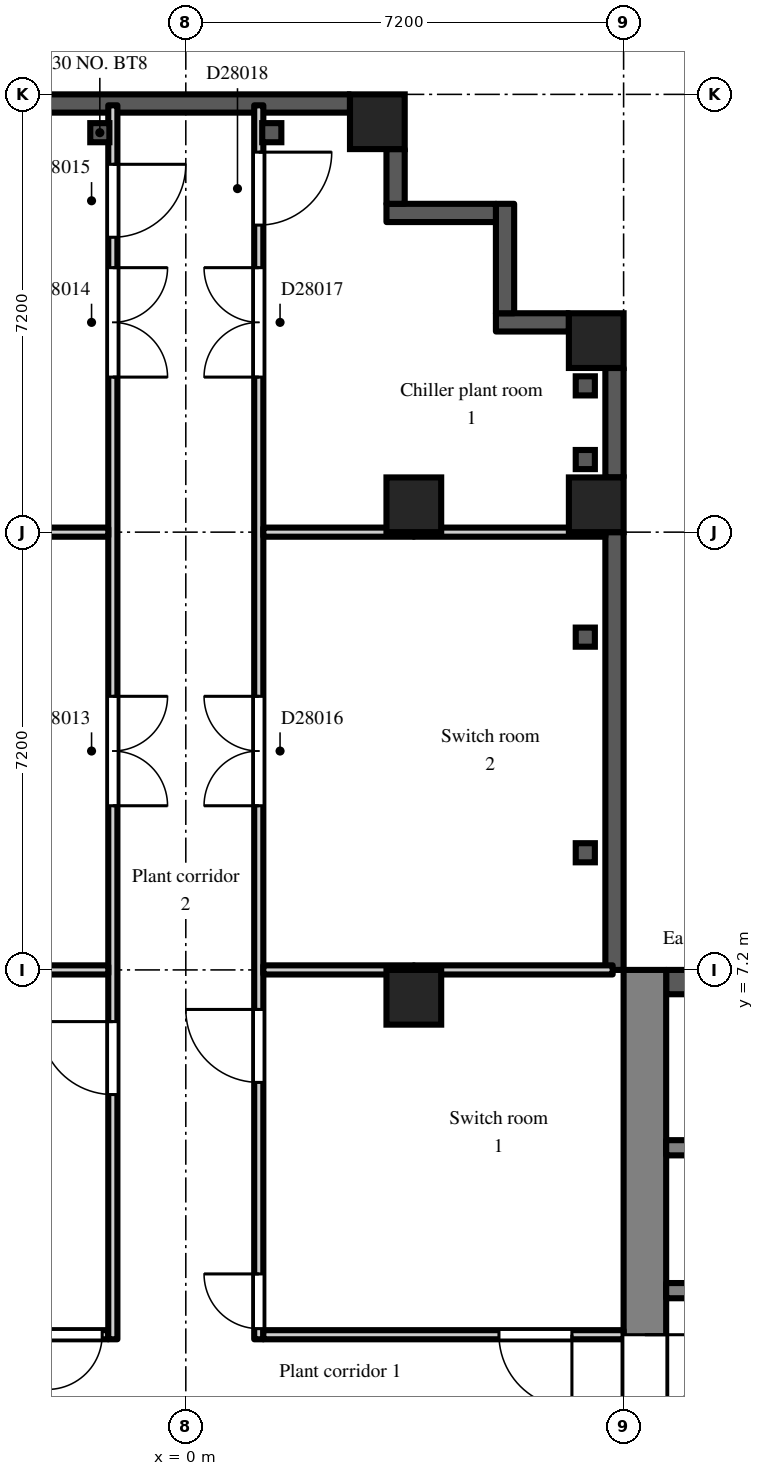
"""IFC4 building model, lengths in metres.
Left out: names, types, materials, properties, quantities, classifications, styles, units other than length and angle.
Written with IfcOpenShell. Run it as: python <this file> out.ifc"""

import sys

from ifc_helpers import new_model, si_unit, direction, frame, frame_2d, origin, origin_2d, place, context, subcontext, project, spatial, rectangle, extrude, element, fill, save


model = new_model("IFC4")
c1 = context("Model", 3, precision=1e-05, world=origin(), true_north=direction((0.0, 1.0)))
c2 = subcontext(c1, "Body", "Model", "MODEL_VIEW")
j1 = project(units=[si_unit("LENGTHUNIT", "METRE"), si_unit("PLANEANGLEUNIT", "RADIAN")], contexts=[c1])
p1 = place(None, origin())
s1 = spatial("IfcSite", under=j1, at=p1, CompositionType="ELEMENT")
p2 = place(p1, origin())
s2 = spatial("IfcBuilding", under=s1, at=p2, CompositionType="ELEMENT")
p3 = place(p2, frame((0.0, 0.0, 194.7)))
s3 = spatial("IfcBuildingStorey", under=s2, at=p3, CompositionType="ELEMENT", Elevation=194.7)
for number, where, z_axis, x_axis in (
    (1, (3.15, 21.15, 0.0), (0.0, 0.0, 1.0), (1.0, 0.0, 0.0)),
    (2, (3.75, 6.75, 0.0), (0.0, 0.0, 1.0), (1.0, 0.0, 0.0)),
    (3, (3.75, 14.85, 0.0), (0.0, 0.0, 1.0), (1.0, 0.0, 0.0)),
    (4, (6.75, 14.85, 0.0), (0.0, 0.0, 1.0), (1.0, 0.0, 0.0)),
    (5, (6.75, 17.55, 0.0), (0.0, 0.0, 1.0), (1.0, 0.0, 0.0)),
):
    element("IfcColumn", number, at=place(p3, frame(where, z_axis=z_axis, x_axis=x_axis)), inside=s3, PredefinedType="COLUMN", context=c2, shape_type="SweptSolid", body=[
        extrude(rectangle(XDim=0.9, YDim=0.9, at=origin_2d()), origin(), (0.0, 0.0, 1.0), 4.2),
    ])
p4 = place(p3, frame((7.05, 7.2, 0.0), z_axis=(0.0, 0.0, 1.0), x_axis=(0.0, 1.0, 0.0)))
e6 = element("IfcWall", 6, at=p4, inside=s3, PredefinedType="SOLIDWALL", context=c2, shape_type="SweptSolid", body=[
    extrude(rectangle(XDim=7.2, YDim=0.3, at=frame_2d((3.6, 0.0))), origin(), (0.0, 0.0, 1.0), 3.8),
])
p5 = place(p3, frame((7.05, 15.3, 0.0), z_axis=(0.0, 0.0, 1.0), x_axis=(0.0, 1.0, 0.0)))
e7 = element("IfcWall", 7, at=p5, inside=s3, PredefinedType="SOLIDWALL", context=c2, shape_type="SweptSolid", body=[
    extrude(rectangle(XDim=1.8, YDim=0.3, at=frame_2d((0.9, 0.0))), origin(), (0.0, 0.0, 1.0), 3.5),
])
p6 = place(p3, frame((6.3, 17.85, 0.0), z_axis=(0.0, 0.0, 1.0), x_axis=(-1.0, 0.0, 0.0)))
e8 = element("IfcWall", 8, at=p6, inside=s3, PredefinedType="SOLIDWALL", context=c2, shape_type="SweptSolid", body=[
    extrude(rectangle(XDim=1.2, YDim=0.3, at=frame_2d((0.6, 0.0))), origin(), (0.0, 0.0, 1.0), 3.8),
])
for number, where, z_axis, x_axis in (
    (9, (5.25, 18.0, 0.0), (0.0, 0.0, 1.0), (0.0, 1.0, 0.0)),
    (10, (5.1, 19.65, 0.0), (0.0, 0.0, 1.0), (-1.0, 0.0, 0.0)),
):
    element("IfcWall", number, at=place(p3, frame(where, z_axis=z_axis, x_axis=x_axis)), inside=s3, PredefinedType="SOLIDWALL", context=c2, shape_type="SweptSolid", body=[
        extrude(rectangle(XDim=1.8, YDim=0.3, at=frame_2d((0.9, 0.0))), origin(), (0.0, 0.0, 1.0), 3.8),
    ])
p7 = place(p3, frame((3.45, 19.8, 0.0), z_axis=(0.0, 0.0, 1.0), x_axis=(0.0, 1.0, 0.0)))
e11 = element("IfcWall", 11, at=p7, inside=s3, PredefinedType="SOLIDWALL", context=c2, shape_type="SweptSolid", body=[
    extrude(rectangle(XDim=0.9, YDim=0.3, at=frame_2d((0.45, 0.0))), origin(), (0.0, 0.0, 1.0), 3.8),
])
p8 = place(p3, frame((2.7, 21.45, 0.0), z_axis=(0.0, 0.0, 1.0), x_axis=(-1.0, 0.0, 0.0)))
e12 = element("IfcWall", 12, at=p8, inside=s3, PredefinedType="SOLIDWALL", context=c2, shape_type="SweptSolid", body=[
    extrude(rectangle(XDim=5.4, YDim=0.3, at=frame_2d((2.7, 0.0))), origin(), (0.0, 0.0, 1.0), 3.5),
])
p9 = place(p3, frame((7.55, -7.2, 0.0), z_axis=(0.0, 0.0, 1.0), x_axis=(0.0, 1.0, 0.0)))
e13 = element("IfcWall", 13, at=p9, inside=s3, PredefinedType="SHEAR", context=c2, shape_type="SweptSolid", body=[
    extrude(rectangle(XDim=14.4, YDim=0.7, at=frame_2d((7.2, 0.0))), origin(), (0.0, 0.0, 1.0), 3.8),
])
p10 = place(p9, frame((6.0, 0.0, 0.0)))
e14 = element("IfcOpeningElement", 14, at=p10, cuts=e13, PredefinedType="OPENING", context=c2, shape_type="SweptSolid", body=[
    extrude(rectangle(XDim=2.4, YDim=2.2, at=frame_2d((1.2, 1.1))), frame((0.0, 0.36, 0.0), z_axis=(0.0, -1.0, 0.0), x_axis=(1.0, 0.0, 0.0)), (0.0, 0.0, 1.0), 0.72),
])
p11 = place(p3, frame((7.9, 7.0, 0.0), z_axis=(0.0, 0.0, 1.0), x_axis=(1.0, 0.0, 0.0)))
e15 = element("IfcWall", 15, at=p11, inside=s3, PredefinedType="SHEAR", context=c2, shape_type="SweptSolid", body=[
    extrude(rectangle(XDim=12.95, YDim=0.4, at=frame_2d((6.475, 0.0))), origin(), (0.0, 0.0, 1.0), 3.8),
])
p12 = place(p3, frame((7.9, 1.925, 0.0), z_axis=(0.0, 0.0, 1.0), x_axis=(1.0, 0.0, 0.0)))
e16 = element("IfcWall", 16, at=p12, inside=s3, PredefinedType="SHEAR", context=c2, shape_type="SweptSolid", body=[
    extrude(rectangle(XDim=12.95, YDim=0.25, at=frame_2d((6.475, 0.0))), origin(), (0.0, 0.0, 1.0), 3.8),
])
p13 = place(p12, frame((4.825, 0.0, 0.0)))
e17 = element("IfcOpeningElement", 17, at=p13, cuts=e16, PredefinedType="OPENING", context=c2, shape_type="SweptSolid", body=[
    extrude(rectangle(XDim=1.1, YDim=2.1, at=frame_2d((0.55, 1.05))), frame((0.0, 0.135, 0.0), z_axis=(0.0, -1.0, 0.0), x_axis=(1.0, 0.0, 0.0)), (0.0, 0.0, 1.0), 0.27),
])
p14 = place(p12, frame((7.025, 0.0, 0.0)))
e18 = element("IfcOpeningElement", 18, at=p14, cuts=e16, PredefinedType="OPENING", context=c2, shape_type="SweptSolid", body=[
    extrude(rectangle(XDim=1.1, YDim=2.1, at=frame_2d((0.55, 1.05))), frame((0.0, 0.135, 0.0), z_axis=(0.0, -1.0, 0.0), x_axis=(1.0, 0.0, 0.0)), (0.0, 0.0, 1.0), 0.27),
])
p15 = place(p12, frame((9.225, 0.0, 0.0)))
e19 = element("IfcOpeningElement", 19, at=p15, cuts=e16, PredefinedType="OPENING", context=c2, shape_type="SweptSolid", body=[
    extrude(rectangle(XDim=1.1, YDim=2.1, at=frame_2d((0.55, 1.05))), frame((0.0, 0.135, 0.0), z_axis=(0.0, -1.0, 0.0), x_axis=(1.0, 0.0, 0.0)), (0.0, 0.0, 1.0), 0.27),
])
p16 = place(p12, frame((0.525, 0.0, 0.0)))
e20 = element("IfcOpeningElement", 20, at=p16, cuts=e16, PredefinedType="OPENING", context=c2, shape_type="SweptSolid", body=[
    extrude(rectangle(XDim=0.9, YDim=2.1, at=frame_2d((0.45, 1.05))), frame((0.0, 0.135, 0.0), z_axis=(0.0, -1.0, 0.0), x_axis=(1.0, 0.0, 0.0)), (0.0, 0.0, 1.0), 0.27),
])
p17 = place(p12, frame((2.625, 0.0, 0.0)))
e21 = element("IfcOpeningElement", 21, at=p17, cuts=e16, PredefinedType="OPENING", context=c2, shape_type="SweptSolid", body=[
    extrude(rectangle(XDim=1.1, YDim=2.1, at=frame_2d((0.55, 1.05))), frame((0.0, 0.135, 0.0), z_axis=(0.0, -1.0, 0.0), x_axis=(1.0, 0.0, 0.0)), (0.0, 0.0, 1.0), 0.27),
])
p18 = place(p12, frame((11.525, 0.0, 0.0)))
e22 = element("IfcOpeningElement", 22, at=p18, cuts=e16, PredefinedType="OPENING", context=c2, shape_type="SweptSolid", body=[
    extrude(rectangle(XDim=0.9, YDim=2.1, at=frame_2d((0.45, 1.05))), frame((0.0, 0.135, 0.0), z_axis=(0.0, -1.0, 0.0), x_axis=(1.0, 0.0, 0.0)), (0.0, 0.0, 1.0), 0.27),
])
p19 = place(p3, frame((7.9, 4.275, 0.0), z_axis=(0.0, 0.0, 1.0), x_axis=(1.0, 0.0, 0.0)))
e23 = element("IfcWall", 23, at=p19, inside=s3, PredefinedType="SHEAR", context=c2, shape_type="SweptSolid", body=[
    extrude(rectangle(XDim=1.95, YDim=0.25, at=frame_2d((0.975, 0.0))), origin(), (0.0, 0.0, 1.0), 3.8),
])
p20 = place(p3, frame((-7.2, 1.2, 0.0), z_axis=(0.0, 0.0, 1.0), x_axis=(1.0, 0.0, 0.0)))
e24 = element("IfcWall", 24, at=p20, inside=s3, PredefinedType="PARTITIONING", context=c2, shape_type="SweptSolid", body=[
    extrude(rectangle(XDim=5.925, YDim=0.15, at=frame_2d((2.962, 0.0))), origin(), (0.0, 0.0, 1.0), 3.8),
])
p21 = place(p20, frame((0.65, 0.0, 0.0)))
e25 = element("IfcOpeningElement", 25, at=p21, cuts=e24, PredefinedType="OPENING", context=c2, shape_type="SweptSolid", body=[
    extrude(rectangle(XDim=1.2, YDim=2.1, at=frame_2d((0.6, 1.05))), frame((0.0, 0.085, 0.0), z_axis=(0.0, -1.0, 0.0), x_axis=(1.0, 0.0, 0.0)), (0.0, 0.0, 1.0), 0.17),
])
p22 = place(p20, frame((4.925, 0.0, 0.0)))
e26 = element("IfcOpeningElement", 26, at=p22, cuts=e24, PredefinedType="OPENING", context=c2, shape_type="SweptSolid", body=[
    extrude(rectangle(XDim=0.9, YDim=2.1, at=frame_2d((0.45, 1.05))), frame((0.0, 0.085, 0.0), z_axis=(0.0, -1.0, 0.0), x_axis=(1.0, 0.0, 0.0)), (0.0, 0.0, 1.0), 0.17),
])
p23 = place(p3, frame((-1.2, 1.125, 0.0), z_axis=(0.0, 0.0, 1.0), x_axis=(0.0, 1.0, 0.0)))
e27 = element("IfcWall", 27, at=p23, inside=s3, PredefinedType="PARTITIONING", context=c2, shape_type="SweptSolid", body=[
    extrude(rectangle(XDim=20.295, YDim=0.15, at=frame_2d((10.147, 0.0))), origin(), (0.0, 0.0, 1.0), 3.8),
])
p24 = place(p23, frame((4.025, 0.0, 0.0)))
e28 = element("IfcOpeningElement", 28, at=p24, cuts=e27, PredefinedType="OPENING", context=c2, shape_type="SweptSolid", body=[
    extrude(rectangle(XDim=1.2, YDim=2.1, at=frame_2d((0.6, 1.05))), frame((0.0, 0.085, 0.0), z_axis=(0.0, -1.0, 0.0), x_axis=(1.0, 0.0, 0.0)), (0.0, 0.0, 1.0), 0.17),
])
p25 = place(p23, frame((8.775, 0.0, 0.0)))
e29 = element("IfcOpeningElement", 29, at=p25, cuts=e27, PredefinedType="OPENING", context=c2, shape_type="SweptSolid", body=[
    extrude(rectangle(XDim=1.8, YDim=2.1, at=frame_2d((0.9, 1.05))), frame((0.0, 0.085, 0.0), z_axis=(0.0, -1.0, 0.0), x_axis=(1.0, 0.0, 0.0)), (0.0, 0.0, 1.0), 0.17),
])
p26 = place(p23, frame((15.825, 0.0, 0.0)))
e30 = element("IfcOpeningElement", 30, at=p26, cuts=e27, PredefinedType="OPENING", context=c2, shape_type="SweptSolid", body=[
    extrude(rectangle(XDim=1.8, YDim=2.1, at=frame_2d((0.9, 1.05))), frame((0.0, 0.085, 0.0), z_axis=(0.0, -1.0, 0.0), x_axis=(1.0, 0.0, 0.0)), (0.0, 0.0, 1.0), 0.17),
])
p27 = place(p23, frame((18.125, 0.0, 0.0)))
e31 = element("IfcOpeningElement", 31, at=p27, cuts=e27, PredefinedType="OPENING", context=c2, shape_type="SweptSolid", body=[
    extrude(rectangle(XDim=1.2, YDim=2.1, at=frame_2d((0.6, 1.05))), frame((0.0, 0.085, 0.0), z_axis=(0.0, -1.0, 0.0), x_axis=(1.0, 0.0, 0.0)), (0.0, 0.0, 1.0), 0.17),
])
p28 = place(p3, frame((1.2, 1.125, 0.0), z_axis=(0.0, 0.0, 1.0), x_axis=(0.0, 1.0, 0.0)))
e32 = element("IfcWall", 32, at=p28, inside=s3, PredefinedType="PARTITIONING", context=c2, shape_type="SweptSolid", body=[
    extrude(rectangle(XDim=20.295, YDim=0.15, at=frame_2d((10.147, 0.0))), origin(), (0.0, 0.0, 1.0), 3.8),
])
p29 = place(p28, frame((0.175, 0.0, 0.0)))
e33 = element("IfcOpeningElement", 33, at=p29, cuts=e32, PredefinedType="OPENING", context=c2, shape_type="SweptSolid", body=[
    extrude(rectangle(XDim=0.9, YDim=2.1, at=frame_2d((0.45, 1.05))), frame((0.0, 0.085, 0.0), z_axis=(0.0, -1.0, 0.0), x_axis=(1.0, 0.0, 0.0)), (0.0, 0.0, 1.0), 0.17),
])
p30 = place(p28, frame((4.225, 0.0, 0.0)))
e34 = element("IfcOpeningElement", 34, at=p30, cuts=e32, PredefinedType="OPENING", context=c2, shape_type="SweptSolid", body=[
    extrude(rectangle(XDim=1.2, YDim=2.1, at=frame_2d((0.6, 1.05))), frame((0.0, 0.085, 0.0), z_axis=(0.0, -1.0, 0.0), x_axis=(1.0, 0.0, 0.0)), (0.0, 0.0, 1.0), 0.17),
])
p31 = place(p28, frame((8.775, 0.0, 0.0)))
e35 = element("IfcOpeningElement", 35, at=p31, cuts=e32, PredefinedType="OPENING", context=c2, shape_type="SweptSolid", body=[
    extrude(rectangle(XDim=1.8, YDim=2.1, at=frame_2d((0.9, 1.05))), frame((0.0, 0.085, 0.0), z_axis=(0.0, -1.0, 0.0), x_axis=(1.0, 0.0, 0.0)), (0.0, 0.0, 1.0), 0.17),
])
p32 = place(p28, frame((15.825, 0.0, 0.0)))
e36 = element("IfcOpeningElement", 36, at=p32, cuts=e32, PredefinedType="OPENING", context=c2, shape_type="SweptSolid", body=[
    extrude(rectangle(XDim=1.8, YDim=2.1, at=frame_2d((0.9, 1.05))), frame((0.0, 0.085, 0.0), z_axis=(0.0, -1.0, 0.0), x_axis=(1.0, 0.0, 0.0)), (0.0, 0.0, 1.0), 0.17),
])
p33 = place(p28, frame((18.325, 0.0, 0.0)))
e37 = element("IfcOpeningElement", 37, at=p33, cuts=e32, PredefinedType="OPENING", context=c2, shape_type="SweptSolid", body=[
    extrude(rectangle(XDim=1.2, YDim=2.1, at=frame_2d((0.6, 1.05))), frame((0.0, 0.085, 0.0), z_axis=(0.0, -1.0, 0.0), x_axis=(1.0, 0.0, 0.0)), (0.0, 0.0, 1.0), 0.17),
])
p34 = place(p3, frame((1.275, 1.2, 0.0), z_axis=(0.0, 0.0, 1.0), x_axis=(1.0, 0.0, 0.0)))
e38 = element("IfcWall", 38, at=p34, inside=s3, PredefinedType="PARTITIONING", context=c2, shape_type="SweptSolid", body=[
    extrude(rectangle(XDim=5.925, YDim=0.15, at=frame_2d((2.962, 0.0))), origin(), (0.0, 0.0, 1.0), 3.8),
])
p35 = place(p34, frame((3.875, 0.0, 0.0)))
e39 = element("IfcOpeningElement", 39, at=p35, cuts=e38, PredefinedType="OPENING", context=c2, shape_type="SweptSolid", body=[
    extrude(rectangle(XDim=1.2, YDim=2.1, at=frame_2d((0.6, 1.05))), frame((0.0, 0.085, 0.0), z_axis=(0.0, -1.0, 0.0), x_axis=(1.0, 0.0, 0.0)), (0.0, 0.0, 1.0), 0.17),
])
for number, where, z_axis, x_axis in (
    (40, (1.275, 7.2, 0.0), (0.0, 0.0, 1.0), (1.0, 0.0, 0.0)),
    (41, (1.275, 14.4, 0.0), (0.0, 0.0, 1.0), (1.0, 0.0, 0.0)),
    (42, (-3.75, 7.2, 0.0), (0.0, 0.0, 1.0), (1.0, 0.0, 0.0)),
    (43, (-3.75, 14.4, 0.0), (0.0, 0.0, 1.0), (1.0, 0.0, 0.0)),
):
    element("IfcWall", number, at=place(p3, frame(where, z_axis=z_axis, x_axis=x_axis)), inside=s3, PredefinedType="PARTITIONING", context=c2, shape_type="SweptSolid", body=[
        extrude(rectangle(XDim=2.475, YDim=0.15, at=frame_2d((1.238, 0.0))), origin(), (0.0, 0.0, 1.0), 3.8),
    ])
p36 = place(p3, frame((3.75, 7.2, 0.0), z_axis=(0.0, 0.0, 1.0), x_axis=(1.0, 0.0, 0.0)))
e44 = element("IfcWall", 44, at=p36, inside=s3, PredefinedType="PARTITIONING", context=c2, shape_type="SweptSolid", body=[
    extrude(rectangle(XDim=3.27, YDim=0.15, at=frame_2d((1.635, 0.0))), origin(), (0.0, 0.0, 1.0), 3.5),
])
p37 = place(p3, frame((3.75, 14.4, 0.0), z_axis=(0.0, 0.0, 1.0), x_axis=(1.0, 0.0, 0.0)))
e45 = element("IfcWall", 45, at=p37, inside=s3, PredefinedType="PARTITIONING", context=c2, shape_type="SweptSolid", body=[
    extrude(rectangle(XDim=3.15, YDim=0.15, at=frame_2d((1.575, 0.0))), origin(), (0.0, 0.0, 1.0), 3.5),
])
p38 = place(p10, frame((2.4, 0.0, 0.0), z_axis=(0.0, 0.0, 1.0), x_axis=(-1.0, 0.0, 0.0)))
e46 = element("IfcDoor", 46, at=p38, inside=s3, OperationType="DOUBLE_DOOR_DOUBLE_SWING", PredefinedType="DOOR", context=c2, shape_type="SweptSolid", body=[
    extrude(rectangle(XDim=2.4, YDim=2.2, at=frame_2d((1.2, 1.1))), frame((0.0, 0.025, 0.0), z_axis=(0.0, -1.0, 0.0), x_axis=(1.0, 0.0, 0.0)), (0.0, 0.0, 1.0), 0.05),
])
fill(e14, e46)
p39 = place(p29, origin())
e47 = element("IfcDoor", 47, at=p39, inside=s3, OperationType="SINGLE_SWING_RIGHT", PredefinedType="DOOR", context=c2, shape_type="SweptSolid", body=[
    extrude(rectangle(XDim=0.9, YDim=2.1, at=frame_2d((0.45, 1.05))), frame((0.0, 0.025, 0.0), z_axis=(0.0, -1.0, 0.0), x_axis=(1.0, 0.0, 0.0)), (0.0, 0.0, 1.0), 0.05),
])
fill(e33, e47)
p40 = place(p30, origin())
e48 = element("IfcDoor", 48, at=p40, inside=s3, OperationType="SINGLE_SWING_RIGHT", PredefinedType="DOOR", context=c2, shape_type="SweptSolid", body=[
    extrude(rectangle(XDim=1.2, YDim=2.1, at=frame_2d((0.6, 1.05))), frame((0.0, 0.025, 0.0), z_axis=(0.0, -1.0, 0.0), x_axis=(1.0, 0.0, 0.0)), (0.0, 0.0, 1.0), 0.05),
])
fill(e34, e48)
p41 = place(p35, frame((1.2, 0.0, 0.0), z_axis=(0.0, 0.0, 1.0), x_axis=(-1.0, 0.0, 0.0)))
e49 = element("IfcDoor", 49, at=p41, inside=s3, OperationType="SINGLE_SWING_LEFT", PredefinedType="DOOR", context=c2, shape_type="SweptSolid", body=[
    extrude(rectangle(XDim=1.2, YDim=2.1, at=frame_2d((0.6, 1.05))), frame((0.0, 0.025, 0.0), z_axis=(0.0, -1.0, 0.0), x_axis=(1.0, 0.0, 0.0)), (0.0, 0.0, 1.0), 0.05),
])
fill(e39, e49)
p42 = place(p22, frame((0.9, 0.0, 0.0), z_axis=(0.0, 0.0, 1.0), x_axis=(-1.0, 0.0, 0.0)))
e50 = element("IfcDoor", 50, at=p42, inside=s3, OperationType="SINGLE_SWING_RIGHT", PredefinedType="DOOR", context=c2, shape_type="SweptSolid", body=[
    extrude(rectangle(XDim=0.9, YDim=2.1, at=frame_2d((0.45, 1.05))), frame((0.0, 0.025, 0.0), z_axis=(0.0, -1.0, 0.0), x_axis=(1.0, 0.0, 0.0)), (0.0, 0.0, 1.0), 0.05),
])
fill(e26, e50)
p43 = place(p24, origin())
e51 = element("IfcDoor", 51, at=p43, inside=s3, OperationType="SINGLE_SWING_RIGHT", PredefinedType="DOOR", context=c2, shape_type="SweptSolid", body=[
    extrude(rectangle(XDim=1.2, YDim=2.1, at=frame_2d((0.6, 1.05))), frame((0.0, 0.025, 0.0), z_axis=(0.0, -1.0, 0.0), x_axis=(1.0, 0.0, 0.0)), (0.0, 0.0, 1.0), 0.05),
])
fill(e28, e51)
p44 = place(p25, frame((1.8, 0.0, 0.0), z_axis=(0.0, 0.0, 1.0), x_axis=(-1.0, 0.0, 0.0)))
e52 = element("IfcDoor", 52, at=p44, inside=s3, OperationType="DOUBLE_DOOR_DOUBLE_SWING", PredefinedType="DOOR", context=c2, shape_type="SweptSolid", body=[
    extrude(rectangle(XDim=1.8, YDim=2.1, at=frame_2d((0.9, 1.05))), frame((0.0, 0.025, 0.0), z_axis=(0.0, -1.0, 0.0), x_axis=(1.0, 0.0, 0.0)), (0.0, 0.0, 1.0), 0.05),
])
fill(e29, e52)
p45 = place(p26, frame((1.8, 0.0, 0.0), z_axis=(0.0, 0.0, 1.0), x_axis=(-1.0, 0.0, 0.0)))
e53 = element("IfcDoor", 53, at=p45, inside=s3, OperationType="DOUBLE_DOOR_DOUBLE_SWING", PredefinedType="DOOR", context=c2, shape_type="SweptSolid", body=[
    extrude(rectangle(XDim=1.8, YDim=2.1, at=frame_2d((0.9, 1.05))), frame((0.0, 0.025, 0.0), z_axis=(0.0, -1.0, 0.0), x_axis=(1.0, 0.0, 0.0)), (0.0, 0.0, 1.0), 0.05),
])
fill(e30, e53)
p46 = place(p27, frame((1.2, 0.0, 0.0), z_axis=(0.0, 0.0, 1.0), x_axis=(-1.0, 0.0, 0.0)))
e54 = element("IfcDoor", 54, at=p46, inside=s3, OperationType="SINGLE_SWING_LEFT", PredefinedType="DOOR", context=c2, shape_type="SweptSolid", body=[
    extrude(rectangle(XDim=1.2, YDim=2.1, at=frame_2d((0.6, 1.05))), frame((0.0, 0.025, 0.0), z_axis=(0.0, -1.0, 0.0), x_axis=(1.0, 0.0, 0.0)), (0.0, 0.0, 1.0), 0.05),
])
fill(e31, e54)
p47 = place(p31, origin())
e55 = element("IfcDoor", 55, at=p47, inside=s3, OperationType="DOUBLE_DOOR_DOUBLE_SWING", PredefinedType="DOOR", context=c2, shape_type="SweptSolid", body=[
    extrude(rectangle(XDim=1.8, YDim=2.1, at=frame_2d((0.9, 1.05))), frame((0.0, 0.025, 0.0), z_axis=(0.0, -1.0, 0.0), x_axis=(1.0, 0.0, 0.0)), (0.0, 0.0, 1.0), 0.05),
])
fill(e35, e55)
p48 = place(p32, origin())
e56 = element("IfcDoor", 56, at=p48, inside=s3, OperationType="DOUBLE_DOOR_DOUBLE_SWING", PredefinedType="DOOR", context=c2, shape_type="SweptSolid", body=[
    extrude(rectangle(XDim=1.8, YDim=2.1, at=frame_2d((0.9, 1.05))), frame((0.0, 0.025, 0.0), z_axis=(0.0, -1.0, 0.0), x_axis=(1.0, 0.0, 0.0)), (0.0, 0.0, 1.0), 0.05),
])
fill(e36, e56)
p49 = place(p33, frame((1.2, 0.0, 0.0), z_axis=(0.0, 0.0, 1.0), x_axis=(-1.0, 0.0, 0.0)))
e57 = element("IfcDoor", 57, at=p49, inside=s3, OperationType="SINGLE_SWING_LEFT", PredefinedType="DOOR", context=c2, shape_type="SweptSolid", body=[
    extrude(rectangle(XDim=1.2, YDim=2.1, at=frame_2d((0.6, 1.05))), frame((0.0, 0.025, 0.0), z_axis=(0.0, -1.0, 0.0), x_axis=(1.0, 0.0, 0.0)), (0.0, 0.0, 1.0), 0.05),
])
fill(e37, e57)
save(model, sys.argv[1])
